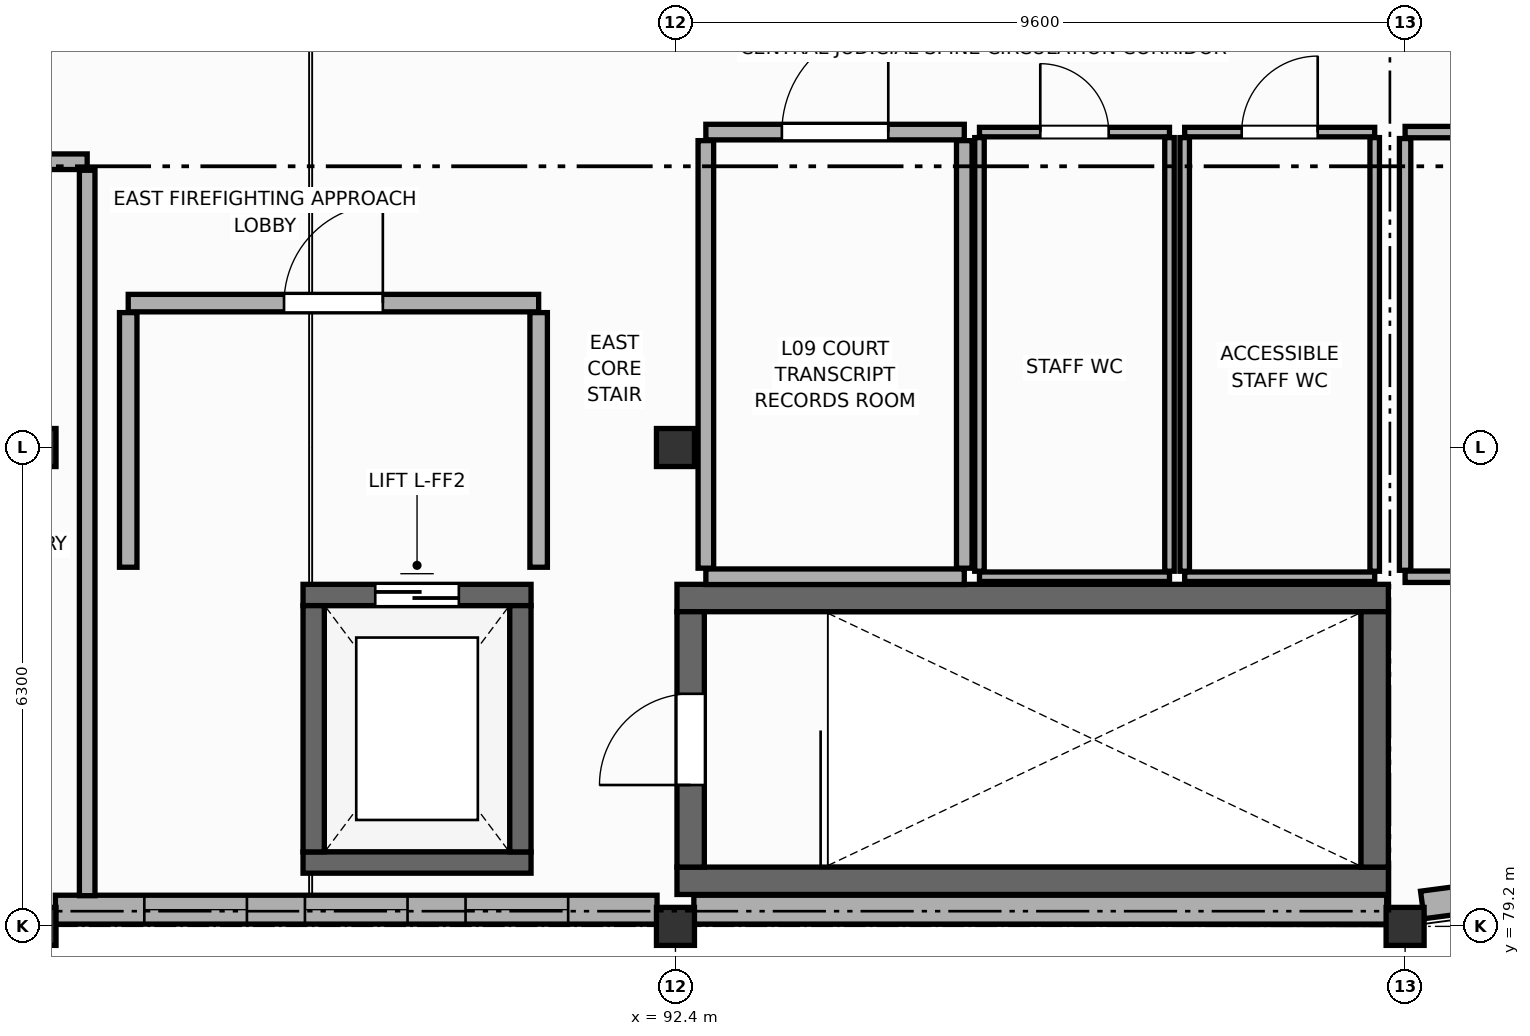
"""IFC4 building model, lengths in metres.
Left out: names, types, materials, properties, quantities, classifications, styles, units other than length and angle.
Written with IfcOpenShell. Run it as: python <this file> out.ifc"""

import sys

from ifc_helpers import new_model, si_unit, direction, frame, frame_2d, origin, origin_2d, place, context, subcontext, project, spatial, rectangle, extrude, element, fill, save


model = new_model("IFC4")
c1 = context("Model", 3, precision=1e-05, world=origin(), true_north=direction((0.0, 1.0)))
c2 = subcontext(c1, "Body", "Model", "MODEL_VIEW")
j1 = project(units=[si_unit("LENGTHUNIT", "METRE"), si_unit("PLANEANGLEUNIT", "RADIAN")], contexts=[c1])
p1 = place(None, origin())
s1 = spatial("IfcSite", under=j1, at=p1, CompositionType="ELEMENT")
p2 = place(p1, origin())
s2 = spatial("IfcBuilding", under=s1, at=p2, CompositionType="ELEMENT")
p3 = place(p2, frame((0.0, 0.0, 35.4)))
s3 = spatial("IfcBuildingStorey", under=s2, at=p3, CompositionType="ELEMENT", Elevation=35.4)
for number, where, z_axis, x_axis in (
    (1, (84.0, 79.2, 0.0), (0.0, 0.0, 1.0), (1.0, 0.0, 0.0)),
    (2, (84.0, 85.5, 0.0), (0.0, 0.0, 1.0), (1.0, 0.0, 0.0)),
    (3, (92.4, 79.2, 0.0), (0.0, 0.0, 1.0), (1.0, 0.0, 0.0)),
    (4, (92.4, 85.5, 0.0), (0.0, 0.0, 1.0), (1.0, 0.0, 0.0)),
    (5, (102.0, 79.2, 0.0), (0.0, 0.0, 1.0), (1.0, 0.0, 0.0)),
):
    element("IfcColumn", number, at=place(p3, frame(where, z_axis=z_axis, x_axis=x_axis)), inside=s3, PredefinedType="COLUMN", context=c2, shape_type="SweptSolid", body=[
        extrude(rectangle(XDim=0.5, YDim=0.5, at=origin_2d()), origin(), (0.0, 0.0, 1.0), 4.2),
    ])
p4 = place(p3, frame((92.158, 79.42, 0.0), z_axis=(0.0, 0.0, 1.0), x_axis=(-1.0, 0.0, 0.0)))
e6 = element("IfcWall", 6, at=p4, inside=s3, PredefinedType="STANDARD", context=c2, shape_type="SweptSolid", body=[
    extrude(rectangle(XDim=7.916, YDim=0.38, at=frame_2d((3.958, 0.0))), origin(), (0.0, 0.0, 1.0), 3.495),
])
p5 = place(p4, frame((1.17, 0.0, 0.85)))
e7 = element("IfcOpeningElement", 7, at=p5, cuts=e6, PredefinedType="OPENING", context=c2, shape_type="SweptSolid", body=[
    extrude(rectangle(XDim=1.35, YDim=1.95, at=frame_2d((0.675, 0.975))), frame((0.0, 0.2, 0.0), z_axis=(0.0, -1.0, 0.0), x_axis=(1.0, 0.0, 0.0)), (0.0, 0.0, 1.0), 0.4),
])
p6 = place(p4, frame((3.283, 0.0, 0.85)))
e8 = element("IfcOpeningElement", 8, at=p6, cuts=e6, PredefinedType="OPENING", context=c2, shape_type="SweptSolid", body=[
    extrude(rectangle(XDim=1.35, YDim=1.95, at=frame_2d((0.675, 0.975))), frame((0.0, 0.2, 0.0), z_axis=(0.0, -1.0, 0.0), x_axis=(1.0, 0.0, 0.0)), (0.0, 0.0, 1.0), 0.4),
])
p7 = place(p4, frame((5.396, 0.0, 0.85)))
e9 = element("IfcOpeningElement", 9, at=p7, cuts=e6, PredefinedType="OPENING", context=c2, shape_type="SweptSolid", body=[
    extrude(rectangle(XDim=1.35, YDim=1.95, at=frame_2d((0.675, 0.975))), frame((0.0, 0.2, 0.0), z_axis=(0.0, -1.0, 0.0), x_axis=(1.0, 0.0, 0.0)), (0.0, 0.0, 1.0), 0.4),
])
p8 = place(p3, frame((101.758, 79.42, 0.0), z_axis=(0.0, 0.0, 1.0), x_axis=(-1.0, 0.0, 0.0)))
e10 = element("IfcWall", 10, at=p8, inside=s3, PredefinedType="STANDARD", context=c2, shape_type="SweptSolid", body=[
    extrude(rectangle(XDim=9.116, YDim=0.38, at=frame_2d((4.558, 0.0))), origin(), (0.0, 0.0, 1.0), 3.095),
])
p9 = place(p3, frame((102.227, 79.482, 0.0), z_axis=(0.0, 0.0, 1.0), x_axis=(0.991440016295, 0.130562988969, 0.0)))
e11 = element("IfcWall", 11, at=p9, inside=s3, PredefinedType="ELEMENTEDWALL", context=c2, shape_type="SweptSolid", body=[
    extrude(rectangle(XDim=3.027, YDim=0.365, at=frame_2d((1.514, 0.0))), origin(), (0.0, 0.0, 1.0), 3.095),
])
p10 = place(p9, frame((1.128, 0.0, 0.85)))
e12 = element("IfcOpeningElement", 12, at=p10, cuts=e11, PredefinedType="OPENING", context=c2, shape_type="SweptSolid", body=[
    extrude(rectangle(XDim=0.8, YDim=1.7, at=frame_2d((0.4, 0.85))), frame((0.0, 0.192, 0.0), z_axis=(0.0, -1.0, 0.0), x_axis=(1.0, 0.0, 0.0)), (0.0, 0.0, 1.0), 0.385),
])
p11 = place(p3, frame((102.0, 79.35, 4.2), z_axis=(0.0, 0.0, 1.0), x_axis=(-1.0, 0.0, 0.0)))
e13 = element("IfcWall", 13, at=p11, inside=s3, PredefinedType="PARAPET", context=c2, shape_type="SweptSolid", body=[
    extrude(rectangle(XDim=43.2, YDim=0.245, at=frame_2d((21.6, 0.0))), origin(), (0.0, 0.0, 1.0), 1.15),
])
p12 = place(p3, frame((102.0, 103.9, 4.2), z_axis=(0.0, 0.0, 1.0), x_axis=(0.0, -1.0, 0.0)))
e14 = element("IfcWall", 14, at=p12, inside=s3, PredefinedType="PARAPET", context=c2, shape_type="SweptSolid", body=[
    extrude(rectangle(XDim=24.2, YDim=0.245, at=frame_2d((12.1, 0.0))), origin(), (0.0, 0.0, 1.0), 1.15),
])
for number, where, z_axis, x_axis in (
    (15, (92.42, 83.52, 0.0), (0.0, 0.0, 1.0), (1.0, 0.0, 0.0)),
    (16, (101.78, 79.8, 0.0), (0.0, 0.0, 1.0), (-1.0, 0.0, 0.0)),
):
    element("IfcWall", number, at=place(p3, frame(where, z_axis=z_axis, x_axis=x_axis)), inside=s3, PredefinedType="SHEAR", context=c2, shape_type="SweptSolid", body=[
        extrude(rectangle(XDim=9.36, YDim=0.36, at=frame_2d((4.68, 0.0))), origin(), (0.0, 0.0, 1.0), 3.98),
    ])
p13 = place(p3, frame((92.6, 79.98, 0.0), z_axis=(0.0, 0.0, 1.0), x_axis=(0.0, 1.0, 0.0)))
e17 = element("IfcWall", 17, at=p13, inside=s3, PredefinedType="SHEAR", context=c2, shape_type="SweptSolid", body=[
    extrude(rectangle(XDim=3.36, YDim=0.36, at=frame_2d((1.68, 0.0))), origin(), (0.0, 0.0, 1.0), 3.98),
])
p14 = place(p13, frame((1.08, 0.0, 0.0)))
e18 = element("IfcOpeningElement", 18, at=p14, cuts=e17, PredefinedType="OPENING", context=c2, shape_type="SweptSolid", body=[
    extrude(rectangle(XDim=1.2, YDim=2.2, at=frame_2d((0.6, 1.1))), frame((0.0, 0.19, 0.0), z_axis=(0.0, -1.0, 0.0), x_axis=(1.0, 0.0, 0.0)), (0.0, 0.0, 1.0), 0.38),
])
p15 = place(p3, frame((101.6, 83.34, 0.0), z_axis=(0.0, 0.0, 1.0), x_axis=(0.0, -1.0, 0.0)))
e19 = element("IfcWall", 19, at=p15, inside=s3, PredefinedType="SHEAR", context=c2, shape_type="SweptSolid", body=[
    extrude(rectangle(XDim=3.36, YDim=0.36, at=frame_2d((1.68, 0.0))), origin(), (0.0, 0.0, 1.0), 3.98),
])
p16 = place(p3, frame((87.5, 83.56, 0.0), z_axis=(0.0, 0.0, 1.0), x_axis=(1.0, 0.0, 0.0)))
e20 = element("IfcWall", 20, at=p16, inside=s3, PredefinedType="SHEAR", context=c2, shape_type="SweptSolid", body=[
    extrude(rectangle(XDim=3.0, YDim=0.28, at=frame_2d((1.5, 0.0))), origin(), (0.0, 0.0, 1.0), 3.98),
])
p17 = place(p16, frame((0.95, 0.0, 0.0)))
e21 = element("IfcOpeningElement", 21, at=p17, cuts=e20, PredefinedType="OPENING", context=c2, shape_type="SweptSolid", body=[
    extrude(rectangle(XDim=1.1, YDim=2.2, at=frame_2d((0.55, 1.1))), frame((0.0, 0.15, 0.0), z_axis=(0.0, -1.0, 0.0), x_axis=(1.0, 0.0, 0.0)), (0.0, 0.0, 1.0), 0.3),
])
p18 = place(p3, frame((90.5, 80.04, 0.0), z_axis=(0.0, 0.0, 1.0), x_axis=(-1.0, 0.0, 0.0)))
e22 = element("IfcWall", 22, at=p18, inside=s3, PredefinedType="SHEAR", context=c2, shape_type="SweptSolid", body=[
    extrude(rectangle(XDim=3.0, YDim=0.28, at=frame_2d((1.5, 0.0))), origin(), (0.0, 0.0, 1.0), 3.98),
])
for number, where, z_axis, x_axis in (
    (23, (87.64, 80.18, 0.0), (0.0, 0.0, 1.0), (0.0, 1.0, 0.0)),
    (24, (90.36, 83.42, 0.0), (0.0, 0.0, 1.0), (0.0, -1.0, 0.0)),
):
    element("IfcWall", number, at=place(p3, frame(where, z_axis=z_axis, x_axis=x_axis)), inside=s3, PredefinedType="SHEAR", context=c2, shape_type="SweptSolid", body=[
        extrude(rectangle(XDim=3.24, YDim=0.28, at=frame_2d((1.62, 0.0))), origin(), (0.0, 0.0, 1.0), 3.98),
    ])
p19 = place(p3, frame((85.2, 87.4, 0.0), z_axis=(0.0, 0.0, 1.0), x_axis=(1.0, 0.0, 0.0)))
e25 = element("IfcWall", 25, at=p19, inside=s3, PredefinedType="STANDARD", context=c2, shape_type="SweptSolid", body=[
    extrude(rectangle(XDim=5.4, YDim=0.23, at=frame_2d((2.7, 0.0))), origin(), (0.0, 0.0, 1.0), 3.95),
])
p20 = place(p19, frame((2.05, 0.0, 0.0)))
e26 = element("IfcOpeningElement", 26, at=p20, cuts=e25, PredefinedType="OPENING", context=c2, shape_type="SweptSolid", body=[
    extrude(rectangle(XDim=1.3, YDim=2.2, at=frame_2d((0.65, 1.1))), frame((0.0, 0.125, 0.0), z_axis=(0.0, -1.0, 0.0), x_axis=(1.0, 0.0, 0.0)), (0.0, 0.0, 1.0), 0.25),
])
for number, where, z_axis, x_axis in (
    (27, (85.2, 83.925, 0.0), (0.0, 0.0, 1.0), (0.0, 1.0, 0.0)),
    (28, (90.6, 87.275, 0.0), (0.0, 0.0, 1.0), (0.0, -1.0, 0.0)),
):
    element("IfcWall", number, at=place(p3, frame(where, z_axis=z_axis, x_axis=x_axis)), inside=s3, PredefinedType="STANDARD", context=c2, shape_type="SweptSolid", body=[
        extrude(rectangle(XDim=3.35, YDim=0.23, at=frame_2d((1.675, 0.0))), origin(), (0.0, 0.0, 1.0), 3.395),
    ])
p21 = place(p3, frame((96.4, 89.65, 0.0), z_axis=(0.0, 0.0, 1.0), x_axis=(1.0, 0.0, 0.0)))
e29 = element("IfcWall", 29, at=p21, inside=s3, PredefinedType="PARTITIONING", context=c2, shape_type="SweptSolid", body=[
    extrude(rectangle(XDim=2.5, YDim=0.125, at=frame_2d((1.25, 0.0))), origin(), (0.0, 0.0, 1.0), 3.95),
])
p22 = place(p21, frame((0.8, 0.0, 0.0)))
e30 = element("IfcOpeningElement", 30, at=p22, cuts=e29, PredefinedType="OPENING", context=c2, shape_type="SweptSolid", body=[
    extrude(rectangle(XDim=0.9, YDim=2.1, at=frame_2d((0.45, 1.05))), frame((0.0, 0.073, 0.0), z_axis=(0.0, -1.0, 0.0), x_axis=(1.0, 0.0, 0.0)), (0.0, 0.0, 1.0), 0.145),
])
p23 = place(p3, frame((98.9, 83.8, 0.0), z_axis=(0.0, 0.0, 1.0), x_axis=(-1.0, 0.0, 0.0)))
e31 = element("IfcWall", 31, at=p23, inside=s3, PredefinedType="PARTITIONING", context=c2, shape_type="SweptSolid", body=[
    extrude(rectangle(XDim=2.5, YDim=0.125, at=frame_2d((1.25, 0.0))), origin(), (0.0, 0.0, 1.0), 3.95),
])
for number, where, z_axis, x_axis in (
    (32, (96.4, 83.873, 0.0), (0.0, 0.0, 1.0), (0.0, 1.0, 0.0)),
    (33, (98.9, 89.577, 0.0), (0.0, 0.0, 1.0), (0.0, -1.0, 0.0)),
):
    element("IfcWall", number, at=place(p3, frame(where, z_axis=z_axis, x_axis=x_axis)), inside=s3, PredefinedType="PARTITIONING", context=c2, shape_type="SweptSolid", body=[
        extrude(rectangle(XDim=5.705, YDim=0.125, at=frame_2d((2.853, 0.0))), origin(), (0.0, 0.0, 1.0), 3.95),
    ])
p24 = place(p3, frame((99.1, 89.65, 0.0), z_axis=(0.0, 0.0, 1.0), x_axis=(1.0, 0.0, 0.0)))
e34 = element("IfcWall", 34, at=p24, inside=s3, PredefinedType="PARTITIONING", context=c2, shape_type="SweptSolid", body=[
    extrude(rectangle(XDim=2.5, YDim=0.125, at=frame_2d((1.25, 0.0))), origin(), (0.0, 0.0, 1.0), 3.095),
])
p25 = place(p24, frame((0.75, 0.0, 0.0)))
e35 = element("IfcOpeningElement", 35, at=p25, cuts=e34, PredefinedType="OPENING", context=c2, shape_type="SweptSolid", body=[
    extrude(rectangle(XDim=1.0, YDim=2.1, at=frame_2d((0.5, 1.05))), frame((0.0, 0.073, 0.0), z_axis=(0.0, -1.0, 0.0), x_axis=(1.0, 0.0, 0.0)), (0.0, 0.0, 1.0), 0.145),
])
p26 = place(p3, frame((101.6, 83.8, 0.0), z_axis=(0.0, 0.0, 1.0), x_axis=(-1.0, 0.0, 0.0)))
e36 = element("IfcWall", 36, at=p26, inside=s3, PredefinedType="PARTITIONING", context=c2, shape_type="SweptSolid", body=[
    extrude(rectangle(XDim=2.5, YDim=0.125, at=frame_2d((1.25, 0.0))), origin(), (0.0, 0.0, 1.0), 3.095),
])
p27 = place(p3, frame((99.1, 83.873, 0.0), z_axis=(0.0, 0.0, 1.0), x_axis=(0.0, 1.0, 0.0)))
e37 = element("IfcWall", 37, at=p27, inside=s3, PredefinedType="PARTITIONING", context=c2, shape_type="SweptSolid", body=[
    extrude(rectangle(XDim=5.705, YDim=0.125, at=frame_2d((2.853, 0.0))), origin(), (0.0, 0.0, 1.0), 3.95),
])
p28 = place(p3, frame((101.6, 89.577, 0.0), z_axis=(0.0, 0.0, 1.0), x_axis=(0.0, -1.0, 0.0)))
e38 = element("IfcWall", 38, at=p28, inside=s3, PredefinedType="PARTITIONING", context=c2, shape_type="SweptSolid", body=[
    extrude(rectangle(XDim=5.705, YDim=0.125, at=frame_2d((2.853, 0.0))), origin(), (0.0, 0.0, 1.0), 3.095),
])
p29 = place(p3, frame((92.8, 89.65, 0.0), z_axis=(0.0, 0.0, 1.0), x_axis=(1.0, 0.0, 0.0)))
e39 = element("IfcWall", 39, at=p29, inside=s3, PredefinedType="STANDARD", context=c2, shape_type="SweptSolid", body=[
    extrude(rectangle(XDim=3.4, YDim=0.205, at=frame_2d((1.7, 0.0))), origin(), (0.0, 0.0, 1.0), 3.95),
])
p30 = place(p29, frame((1.0, 0.0, 0.0)))
e40 = element("IfcOpeningElement", 40, at=p30, cuts=e39, PredefinedType="OPENING", context=c2, shape_type="SweptSolid", body=[
    extrude(rectangle(XDim=1.4, YDim=2.25, at=frame_2d((0.7, 1.125))), frame((0.0, 0.113, 0.0), z_axis=(0.0, -1.0, 0.0), x_axis=(1.0, 0.0, 0.0)), (0.0, 0.0, 1.0), 0.225),
])
p31 = place(p3, frame((96.2, 83.8, 0.0), z_axis=(0.0, 0.0, 1.0), x_axis=(-1.0, 0.0, 0.0)))
e41 = element("IfcWall", 41, at=p31, inside=s3, PredefinedType="STANDARD", context=c2, shape_type="SweptSolid", body=[
    extrude(rectangle(XDim=3.4, YDim=0.205, at=frame_2d((1.7, 0.0))), origin(), (0.0, 0.0, 1.0), 3.95),
])
for number, where, z_axis, x_axis in (
    (42, (92.8, 83.913, 0.0), (0.0, 0.0, 1.0), (0.0, 1.0, 0.0)),
    (43, (96.2, 89.538, 0.0), (0.0, 0.0, 1.0), (0.0, -1.0, 0.0)),
):
    element("IfcWall", number, at=place(p3, frame(where, z_axis=z_axis, x_axis=x_axis)), inside=s3, PredefinedType="STANDARD", context=c2, shape_type="SweptSolid", body=[
        extrude(rectangle(XDim=5.625, YDim=0.205, at=frame_2d((2.812, 0.0))), origin(), (0.0, 0.0, 1.0), 3.95),
    ])
p32 = place(p3, frame((82.037, 89.26, 0.0), z_axis=(0.0, 0.0, 1.0), x_axis=(1.0, 0.0, 0.0)))
e44 = element("IfcWall", 44, at=p32, inside=s3, PredefinedType="STANDARD", context=c2, shape_type="SweptSolid", body=[
    extrude(rectangle(XDim=2.623, YDim=0.205, at=frame_2d((1.312, 0.0))), origin(), (0.0, 0.0, 1.0), 3.495),
])
p33 = place(p32, frame((0.612, 0.0, 0.0)))
e45 = element("IfcOpeningElement", 45, at=p33, cuts=e44, PredefinedType="OPENING", context=c2, shape_type="SweptSolid", body=[
    extrude(rectangle(XDim=1.4, YDim=2.25, at=frame_2d((0.7, 1.125))), frame((0.0, 0.113, 0.0), z_axis=(0.0, -1.0, 0.0), x_axis=(1.0, 0.0, 0.0)), (0.0, 0.0, 1.0), 0.225),
])
p34 = place(p3, frame((84.66, 89.147, 0.0), z_axis=(0.0, 0.0, 1.0), x_axis=(0.0, -1.0, 0.0)))
e46 = element("IfcWall", 46, at=p34, inside=s3, PredefinedType="STANDARD", context=c2, shape_type="SweptSolid", body=[
    extrude(rectangle(XDim=9.543, YDim=0.205, at=frame_2d((4.772, 0.0))), origin(), (0.0, 0.0, 1.0), 3.395),
])
p35 = place(p3, frame((102.0, 89.65, 0.0), z_axis=(0.0, 0.0, 1.0), x_axis=(1.0, 0.0, 0.0)))
e47 = element("IfcWall", 47, at=p35, inside=s3, PredefinedType="PARTITIONING", context=c2, shape_type="SweptSolid", body=[
    extrude(rectangle(XDim=9.5, YDim=0.15, at=frame_2d((4.75, 0.0))), origin(), (0.0, 0.0, 1.0), 2.995),
])
p36 = place(p35, frame((1.81, 0.0, 0.0)))
e48 = element("IfcOpeningElement", 48, at=p36, cuts=e47, PredefinedType="OPENING", context=c2, shape_type="SweptSolid", body=[
    extrude(rectangle(XDim=1.5, YDim=2.35, at=frame_2d((0.75, 1.175))), frame((0.0, 0.085, 0.0), z_axis=(0.0, -1.0, 0.0), x_axis=(1.0, 0.0, 0.0)), (0.0, 0.0, 1.0), 0.17),
])
p37 = place(p3, frame((111.5, 83.8, 0.0), z_axis=(0.0, 0.0, 1.0), x_axis=(-1.0, 0.0, 0.0)))
e49 = element("IfcWall", 49, at=p37, inside=s3, PredefinedType="PARTITIONING", context=c2, shape_type="SweptSolid", body=[
    extrude(rectangle(XDim=9.5, YDim=0.15, at=frame_2d((4.75, 0.0))), origin(), (0.0, 0.0, 1.0), 2.995),
])
p38 = place(p3, frame((102.0, 83.885, 0.0), z_axis=(0.0, 0.0, 1.0), x_axis=(0.0, 1.0, 0.0)))
e50 = element("IfcWall", 50, at=p38, inside=s3, PredefinedType="PARTITIONING", context=c2, shape_type="SweptSolid", body=[
    extrude(rectangle(XDim=5.68, YDim=0.15, at=frame_2d((2.84, 0.0))), origin(), (0.0, 0.0, 1.0), 3.095),
])
p39 = place(p5, origin())
e51 = element("IfcWindow", 51, at=p39, inside=s3, PartitioningType="SINGLE_PANEL", PredefinedType="WINDOW", context=c2, shape_type="SweptSolid", body=[
    extrude(rectangle(XDim=1.35, YDim=1.95, at=frame_2d((0.675, 0.975))), frame((0.0, 0.03, 0.0), z_axis=(0.0, -1.0, 0.0), x_axis=(1.0, 0.0, 0.0)), (0.0, 0.0, 1.0), 0.06),
])
fill(e7, e51)
p40 = place(p6, origin())
e52 = element("IfcWindow", 52, at=p40, inside=s3, PartitioningType="SINGLE_PANEL", PredefinedType="WINDOW", context=c2, shape_type="SweptSolid", body=[
    extrude(rectangle(XDim=1.35, YDim=1.95, at=frame_2d((0.675, 0.975))), frame((0.0, 0.03, 0.0), z_axis=(0.0, -1.0, 0.0), x_axis=(1.0, 0.0, 0.0)), (0.0, 0.0, 1.0), 0.06),
])
fill(e8, e52)
p41 = place(p7, origin())
e53 = element("IfcWindow", 53, at=p41, inside=s3, PartitioningType="SINGLE_PANEL", PredefinedType="WINDOW", context=c2, shape_type="SweptSolid", body=[
    extrude(rectangle(XDim=1.35, YDim=1.95, at=frame_2d((0.675, 0.975))), frame((0.0, 0.03, 0.0), z_axis=(0.0, -1.0, 0.0), x_axis=(1.0, 0.0, 0.0)), (0.0, 0.0, 1.0), 0.06),
])
fill(e9, e53)
p42 = place(p14, origin())
e54 = element("IfcDoor", 54, at=p42, inside=s3, OperationType="SINGLE_SWING_LEFT", PredefinedType="DOOR", context=c2, shape_type="SweptSolid", body=[
    extrude(rectangle(XDim=1.2, YDim=2.2, at=frame_2d((0.6, 1.1))), frame((0.0, 0.025, 0.0), z_axis=(0.0, -1.0, 0.0), x_axis=(1.0, 0.0, 0.0)), (0.0, 0.0, 1.0), 0.05),
])
fill(e18, e54)
p43 = place(p17, origin())
e55 = element("IfcDoor", 55, at=p43, inside=s3, OperationType="DOUBLE_DOOR_SLIDING", PredefinedType="DOOR", context=c2, shape_type="SweptSolid", body=[
    extrude(rectangle(XDim=1.1, YDim=2.2, at=frame_2d((0.55, 1.1))), frame((0.0, 0.025, 0.0), z_axis=(0.0, -1.0, 0.0), x_axis=(1.0, 0.0, 0.0)), (0.0, 0.0, 1.0), 0.05),
])
fill(e21, e55)
p44 = place(p20, origin())
e56 = element("IfcDoor", 56, at=p44, inside=s3, OperationType="SINGLE_SWING_RIGHT", PredefinedType="DOOR", context=c2, shape_type="SweptSolid", body=[
    extrude(rectangle(XDim=1.3, YDim=2.2, at=frame_2d((0.65, 1.1))), frame((0.0, 0.025, 0.0), z_axis=(0.0, -1.0, 0.0), x_axis=(1.0, 0.0, 0.0)), (0.0, 0.0, 1.0), 0.05),
])
fill(e26, e56)
p45 = place(p22, origin())
e57 = element("IfcDoor", 57, at=p45, inside=s3, OperationType="SINGLE_SWING_LEFT", PredefinedType="DOOR", context=c2, shape_type="SweptSolid", body=[
    extrude(rectangle(XDim=0.9, YDim=2.1, at=frame_2d((0.45, 1.05))), frame((0.0, 0.025, 0.0), z_axis=(0.0, -1.0, 0.0), x_axis=(1.0, 0.0, 0.0)), (0.0, 0.0, 1.0), 0.05),
])
fill(e30, e57)
p46 = place(p25, origin())
e58 = element("IfcDoor", 58, at=p46, inside=s3, OperationType="SINGLE_SWING_RIGHT", PredefinedType="DOOR", context=c2, shape_type="SweptSolid", body=[
    extrude(rectangle(XDim=1.0, YDim=2.1, at=frame_2d((0.5, 1.05))), frame((0.0, 0.025, 0.0), z_axis=(0.0, -1.0, 0.0), x_axis=(1.0, 0.0, 0.0)), (0.0, 0.0, 1.0), 0.05),
])
fill(e35, e58)
p47 = place(p30, origin())
e59 = element("IfcDoor", 59, at=p47, inside=s3, OperationType="SINGLE_SWING_RIGHT", PredefinedType="DOOR", context=c2, shape_type="SweptSolid", body=[
    extrude(rectangle(XDim=1.4, YDim=2.25, at=frame_2d((0.7, 1.125))), frame((0.0, 0.025, 0.0), z_axis=(0.0, -1.0, 0.0), x_axis=(1.0, 0.0, 0.0)), (0.0, 0.0, 1.0), 0.05),
])
fill(e40, e59)
save(model, sys.argv[1])
